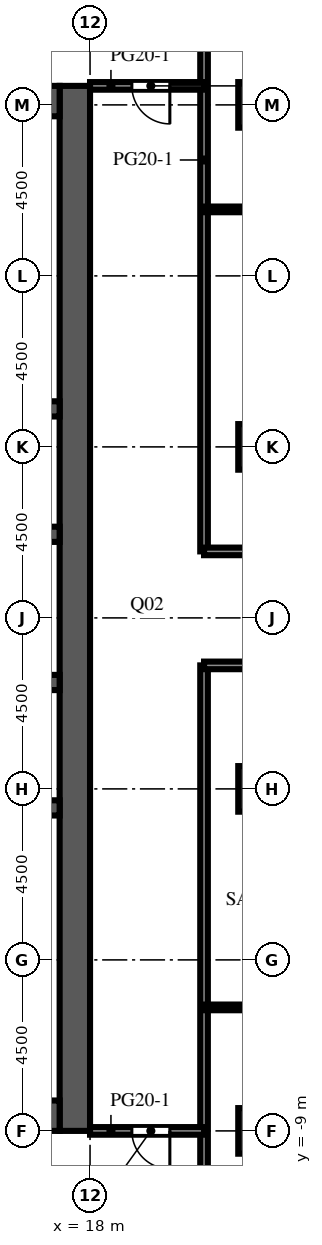
"""IFC4 building model, lengths in metres.
Left out: names, types, materials, properties, quantities, classifications, styles, units other than length and angle.
Written with IfcOpenShell. Run it as: python <this file> out.ifc"""

import sys

from ifc_helpers import new_model, si_unit, direction, frame, frame_2d, origin, origin_2d, place, context, subcontext, project, spatial, rectangle, extrude, element, fill, save


model = new_model("IFC4")
c1 = context("Model", 3, precision=1e-05, world=origin(), true_north=direction((0.0, 1.0)))
c2 = subcontext(c1, "Body", "Model", "MODEL_VIEW")
j1 = project(units=[si_unit("LENGTHUNIT", "METRE"), si_unit("PLANEANGLEUNIT", "RADIAN")], contexts=[c1])
p1 = place(None, origin())
s1 = spatial("IfcSite", under=j1, at=p1, CompositionType="ELEMENT")
p2 = place(p1, origin())
s2 = spatial("IfcBuilding", under=s1, at=p2, CompositionType="ELEMENT")
p3 = place(p2, frame((0.0, 0.0, 195.6)))
s3 = spatial("IfcBuildingStorey", under=s2, at=p3, CompositionType="ELEMENT", Elevation=195.6)
for number, where, z_axis, x_axis in (
    (1, (22.5, -9.0, 0.0), (0.0, 0.0, 1.0), (1.0, 0.0, 0.0)),
    (2, (22.5, 0.0, 0.0), (0.0, 0.0, 1.0), (1.0, 0.0, 0.0)),
    (3, (22.5, 9.0, 0.0), (0.0, 0.0, 1.0), (1.0, 0.0, 0.0)),
    (4, (22.5, 18.0, 0.0), (0.0, 0.0, 1.0), (1.0, 0.0, 0.0)),
):
    element("IfcColumn", number, at=place(p3, frame(where, z_axis=z_axis, x_axis=x_axis)), inside=s3, PredefinedType="COLUMN", context=c2, shape_type="SweptSolid", body=[
        extrude(rectangle(XDim=1.2, YDim=1.2, at=origin_2d()), origin(), (0.0, 0.0, 1.0), 4.1),
    ])
p4 = place(p3, frame((17.6, -9.0, 0.0), z_axis=(0.0, 0.0, 1.0), x_axis=(0.0, 1.0, 0.0)))
e5 = element("IfcWall", 5, at=p4, inside=s3, PredefinedType="SHEAR", context=c2, shape_type="SweptSolid", body=[
    extrude(rectangle(XDim=27.5, YDim=0.8, at=frame_2d((13.75, 0.0))), origin(), (0.0, 0.0, 1.0), 4.1),
])
p5 = place(p4, frame((12.55, 0.0, 0.0)))
e6 = element("IfcOpeningElement", 6, at=p5, cuts=e5, PredefinedType="OPENING", context=c2, shape_type="SweptSolid", body=[
    extrude(rectangle(XDim=2.4, YDim=2.4, at=frame_2d((1.2, 1.2))), frame((0.0, 0.41, 0.0), z_axis=(0.0, -1.0, 0.0), x_axis=(1.0, 0.0, 0.0)), (0.0, 0.0, 1.0), 0.82),
])
p6 = place(p4, frame((6.825, 0.0, 0.0)))
e7 = element("IfcOpeningElement", 7, at=p6, cuts=e5, PredefinedType="OPENING", context=c2, shape_type="SweptSolid", body=[
    extrude(rectangle(XDim=1.2, YDim=2.1, at=frame_2d((0.6, 1.05))), frame((0.0, 0.41, 0.0), z_axis=(0.0, -1.0, 0.0), x_axis=(1.0, 0.0, 0.0)), (0.0, 0.0, 1.0), 0.82),
])
p7 = place(p4, frame((19.475, 0.0, 0.0)))
e8 = element("IfcOpeningElement", 8, at=p7, cuts=e5, PredefinedType="OPENING", context=c2, shape_type="SweptSolid", body=[
    extrude(rectangle(XDim=1.2, YDim=2.1, at=frame_2d((0.6, 1.05))), frame((0.0, 0.41, 0.0), z_axis=(0.0, -1.0, 0.0), x_axis=(1.0, 0.0, 0.0)), (0.0, 0.0, 1.0), 0.82),
])
for number, where, z_axis, x_axis in (
    (9, (6.8, -8.6, 0.0), (0.0, 0.0, 1.0), (1.0, 0.0, 0.0)),
    (10, (6.8, 18.1, 0.0), (0.0, 0.0, 1.0), (1.0, 0.0, 0.0)),
):
    element("IfcWall", number, at=place(p3, frame(where, z_axis=z_axis, x_axis=x_axis)), inside=s3, PredefinedType="SHEAR", context=c2, shape_type="SweptSolid", body=[
        extrude(rectangle(XDim=10.4, YDim=0.8, at=frame_2d((5.2, 0.0))), origin(), (0.0, 0.0, 1.0), 4.1),
    ])
p8 = place(p3, frame((6.8, -0.5, 0.0), z_axis=(0.0, 0.0, 1.0), x_axis=(1.0, 0.0, 0.0)))
e11 = element("IfcWall", 11, at=p8, inside=s3, PredefinedType="SHEAR", context=c2, shape_type="SweptSolid", body=[
    extrude(rectangle(XDim=10.4, YDim=0.4, at=frame_2d((5.2, 0.0))), origin(), (0.0, 0.0, 1.0), 4.1),
])
p9 = place(p3, frame((6.8, 2.8, 0.0), z_axis=(0.0, 0.0, 1.0), x_axis=(1.0, 0.0, 0.0)))
e12 = element("IfcWall", 12, at=p9, inside=s3, PredefinedType="SHEAR", context=c2, shape_type="SweptSolid", body=[
    extrude(rectangle(XDim=10.4, YDim=0.4, at=frame_2d((5.2, 0.0))), origin(), (0.0, 0.0, 1.0), 4.1),
])
p10 = place(p9, frame((0.738, 0.0, 0.0)))
e13 = element("IfcOpeningElement", 13, at=p10, cuts=e12, PredefinedType="OPENING", context=c2, shape_type="SweptSolid", body=[
    extrude(rectangle(XDim=1.1, YDim=2.1, at=frame_2d((0.55, 1.05))), frame((0.0, 0.21, 0.0), z_axis=(0.0, -1.0, 0.0), x_axis=(1.0, 0.0, 0.0)), (0.0, 0.0, 1.0), 0.42),
])
p11 = place(p9, frame((3.337, 0.0, 0.0)))
e14 = element("IfcOpeningElement", 14, at=p11, cuts=e12, PredefinedType="OPENING", context=c2, shape_type="SweptSolid", body=[
    extrude(rectangle(XDim=1.1, YDim=2.1, at=frame_2d((0.55, 1.05))), frame((0.0, 0.21, 0.0), z_axis=(0.0, -1.0, 0.0), x_axis=(1.0, 0.0, 0.0)), (0.0, 0.0, 1.0), 0.42),
])
p12 = place(p9, frame((6.012, 0.0, 0.0)))
e15 = element("IfcOpeningElement", 15, at=p12, cuts=e12, PredefinedType="OPENING", context=c2, shape_type="SweptSolid", body=[
    extrude(rectangle(XDim=1.0, YDim=2.1, at=frame_2d((0.5, 1.05))), frame((0.0, 0.21, 0.0), z_axis=(0.0, -1.0, 0.0), x_axis=(1.0, 0.0, 0.0)), (0.0, 0.0, 1.0), 0.42),
])
p13 = place(p9, frame((8.613, 0.0, 0.0)))
e16 = element("IfcOpeningElement", 16, at=p13, cuts=e12, PredefinedType="OPENING", context=c2, shape_type="SweptSolid", body=[
    extrude(rectangle(XDim=1.0, YDim=2.1, at=frame_2d((0.5, 1.05))), frame((0.0, 0.21, 0.0), z_axis=(0.0, -1.0, 0.0), x_axis=(1.0, 0.0, 0.0)), (0.0, 0.0, 1.0), 0.42),
])
p14 = place(p3, frame((6.8, 6.7, 0.0), z_axis=(0.0, 0.0, 1.0), x_axis=(1.0, 0.0, 0.0)))
e17 = element("IfcWall", 17, at=p14, inside=s3, PredefinedType="SHEAR", context=c2, shape_type="SweptSolid", body=[
    extrude(rectangle(XDim=10.4, YDim=0.4, at=frame_2d((5.2, 0.0))), origin(), (0.0, 0.0, 1.0), 4.1),
])
p15 = place(p14, frame((3.337, 0.0, 0.0)))
e18 = element("IfcOpeningElement", 18, at=p15, cuts=e17, PredefinedType="OPENING", context=c2, shape_type="SweptSolid", body=[
    extrude(rectangle(XDim=1.1, YDim=2.1, at=frame_2d((0.55, 1.05))), frame((0.0, 0.21, 0.0), z_axis=(0.0, -1.0, 0.0), x_axis=(1.0, 0.0, 0.0)), (0.0, 0.0, 1.0), 0.42),
])
p16 = place(p14, frame((5.962, 0.0, 0.0)))
e19 = element("IfcOpeningElement", 19, at=p16, cuts=e17, PredefinedType="OPENING", context=c2, shape_type="SweptSolid", body=[
    extrude(rectangle(XDim=1.1, YDim=2.1, at=frame_2d((0.55, 1.05))), frame((0.0, 0.21, 0.0), z_axis=(0.0, -1.0, 0.0), x_axis=(1.0, 0.0, 0.0)), (0.0, 0.0, 1.0), 0.42),
])
p17 = place(p14, frame((8.663, 0.0, 0.0)))
e20 = element("IfcOpeningElement", 20, at=p17, cuts=e17, PredefinedType="OPENING", context=c2, shape_type="SweptSolid", body=[
    extrude(rectangle(XDim=1.1, YDim=2.1, at=frame_2d((0.55, 1.05))), frame((0.0, 0.21, 0.0), z_axis=(0.0, -1.0, 0.0), x_axis=(1.0, 0.0, 0.0)), (0.0, 0.0, 1.0), 0.42),
])
p18 = place(p14, frame((0.688, 0.0, 0.0)))
e21 = element("IfcOpeningElement", 21, at=p18, cuts=e17, PredefinedType="OPENING", context=c2, shape_type="SweptSolid", body=[
    extrude(rectangle(XDim=1.0, YDim=2.1, at=frame_2d((0.5, 1.05))), frame((0.0, 0.21, 0.0), z_axis=(0.0, -1.0, 0.0), x_axis=(1.0, 0.0, 0.0)), (0.0, 0.0, 1.0), 0.42),
])
p19 = place(p3, frame((6.8, 10.0, 0.0), z_axis=(0.0, 0.0, 1.0), x_axis=(1.0, 0.0, 0.0)))
e22 = element("IfcWall", 22, at=p19, inside=s3, PredefinedType="SHEAR", context=c2, shape_type="SweptSolid", body=[
    extrude(rectangle(XDim=10.4, YDim=0.4, at=frame_2d((5.2, 0.0))), origin(), (0.0, 0.0, 1.0), 4.1),
])
p20 = place(p3, frame((21.0, -26.85, 0.0), z_axis=(0.0, 0.0, 1.0), x_axis=(0.0, 1.0, 0.0)))
e23 = element("IfcWall", 23, at=p20, inside=s3, PredefinedType="PARTITIONING", context=c2, shape_type="SweptSolid", body=[
    extrude(rectangle(XDim=30.1, YDim=0.2, at=frame_2d((15.05, 0.0))), origin(), (0.0, 0.0, 1.0), 3.65),
])
p21 = place(p3, frame((21.0, 6.25, 0.0), z_axis=(0.0, 0.0, 1.0), x_axis=(0.0, 1.0, 0.0)))
e24 = element("IfcWall", 24, at=p21, inside=s3, PredefinedType="PARTITIONING", context=c2, shape_type="SweptSolid", body=[
    extrude(rectangle(XDim=20.6, YDim=0.2, at=frame_2d((10.3, 0.0))), origin(), (0.0, 0.0, 1.0), 3.65),
])
p22 = place(p3, frame((21.0, -9.0, 0.0), z_axis=(0.0, 0.0, 1.0), x_axis=(-1.0, 0.0, 0.0)))
e25 = element("IfcWall", 25, at=p22, inside=s3, PredefinedType="PARTITIONING", context=c2, shape_type="SweptSolid", body=[
    extrude(rectangle(XDim=3.0, YDim=0.2, at=frame_2d((1.5, 0.0))), origin(), (0.0, 0.0, 1.0), 3.65),
])
p23 = place(p22, frame((0.9, 0.0, 0.0)))
e26 = element("IfcOpeningElement", 26, at=p23, cuts=e25, PredefinedType="OPENING", context=c2, shape_type="SweptSolid", body=[
    extrude(rectangle(XDim=1.0, YDim=2.1, at=frame_2d((0.5, 1.05))), frame((0.0, 0.11, 0.0), z_axis=(0.0, -1.0, 0.0), x_axis=(1.0, 0.0, 0.0)), (0.0, 0.0, 1.0), 0.22),
])
p24 = place(p3, frame((31.35, -5.75, 0.0), z_axis=(0.0, 0.0, 1.0), x_axis=(-1.0, 0.0, 0.0)))
e27 = element("IfcWall", 27, at=p24, inside=s3, PredefinedType="PARTITIONING", context=c2, shape_type="SweptSolid", body=[
    extrude(rectangle(XDim=10.35, YDim=0.15, at=frame_2d((5.175, 0.0))), origin(), (0.0, 0.0, 1.0), 3.65),
])
p25 = place(p24, frame((4.75, 0.0, 0.0)))
e28 = element("IfcOpeningElement", 28, at=p25, cuts=e27, PredefinedType="OPENING", context=c2, shape_type="SweptSolid", body=[
    extrude(rectangle(XDim=1.0, YDim=2.1, at=frame_2d((0.5, 1.05))), frame((0.0, 0.085, 0.0), z_axis=(0.0, -1.0, 0.0), x_axis=(1.0, 0.0, 0.0)), (0.0, 0.0, 1.0), 0.17),
])
p26 = place(p3, frame((31.35, 3.25, 0.0), z_axis=(0.0, 0.0, 1.0), x_axis=(-1.0, 0.0, 0.0)))
e29 = element("IfcWall", 29, at=p26, inside=s3, PredefinedType="PARTITIONING", context=c2, shape_type="SweptSolid", body=[
    extrude(rectangle(XDim=10.35, YDim=0.2, at=frame_2d((5.175, 0.0))), origin(), (0.0, 0.0, 1.0), 3.65),
])
p27 = place(p26, frame((4.25, 0.0, 0.0)))
e30 = element("IfcOpeningElement", 30, at=p27, cuts=e29, PredefinedType="OPENING", context=c2, shape_type="SweptSolid", body=[
    extrude(rectangle(XDim=1.0, YDim=2.1, at=frame_2d((0.5, 1.05))), frame((0.0, 0.11, 0.0), z_axis=(0.0, -1.0, 0.0), x_axis=(1.0, 0.0, 0.0)), (0.0, 0.0, 1.0), 0.22),
])
p28 = place(p3, frame((21.0, 6.25, 0.0), z_axis=(0.0, 0.0, 1.0), x_axis=(1.0, 0.0, 0.0)))
e31 = element("IfcWall", 31, at=p28, inside=s3, PredefinedType="PARTITIONING", context=c2, shape_type="SweptSolid", body=[
    extrude(rectangle(XDim=10.35, YDim=0.2, at=frame_2d((5.175, 0.0))), origin(), (0.0, 0.0, 1.0), 3.65),
])
p29 = place(p28, frame((4.85, 0.0, 0.0)))
e32 = element("IfcOpeningElement", 32, at=p29, cuts=e31, PredefinedType="OPENING", context=c2, shape_type="SweptSolid", body=[
    extrude(rectangle(XDim=1.0, YDim=2.1, at=frame_2d((0.5, 1.05))), frame((0.0, 0.11, 0.0), z_axis=(0.0, -1.0, 0.0), x_axis=(1.0, 0.0, 0.0)), (0.0, 0.0, 1.0), 0.22),
])
p30 = place(p3, frame((21.0, 15.25, 0.0), z_axis=(0.0, 0.0, 1.0), x_axis=(1.0, 0.0, 0.0)))
e33 = element("IfcWall", 33, at=p30, inside=s3, PredefinedType="PARTITIONING", context=c2, shape_type="SweptSolid", body=[
    extrude(rectangle(XDim=10.35, YDim=0.15, at=frame_2d((5.175, 0.0))), origin(), (0.0, 0.0, 1.0), 3.65),
])
p31 = place(p30, frame((3.85, 0.0, 0.0)))
e34 = element("IfcOpeningElement", 34, at=p31, cuts=e33, PredefinedType="OPENING", context=c2, shape_type="SweptSolid", body=[
    extrude(rectangle(XDim=1.0, YDim=2.1, at=frame_2d((0.5, 1.05))), frame((0.0, 0.085, 0.0), z_axis=(0.0, -1.0, 0.0), x_axis=(1.0, 0.0, 0.0)), (0.0, 0.0, 1.0), 0.17),
])
p32 = place(p3, frame((18.0, 18.5, 0.0), z_axis=(0.0, 0.0, 1.0), x_axis=(1.0, 0.0, 0.0)))
e35 = element("IfcWall", 35, at=p32, inside=s3, PredefinedType="PARTITIONING", context=c2, shape_type="SweptSolid", body=[
    extrude(rectangle(XDim=3.0, YDim=0.2, at=frame_2d((1.5, 0.0))), origin(), (0.0, 0.0, 1.0), 3.65),
])
p33 = place(p32, frame((1.1, 0.0, 0.0)))
e36 = element("IfcOpeningElement", 36, at=p33, cuts=e35, PredefinedType="OPENING", context=c2, shape_type="SweptSolid", body=[
    extrude(rectangle(XDim=1.0, YDim=2.1, at=frame_2d((0.5, 1.05))), frame((0.0, 0.11, 0.0), z_axis=(0.0, -1.0, 0.0), x_axis=(1.0, 0.0, 0.0)), (0.0, 0.0, 1.0), 0.22),
])
p34 = place(p5, origin())
e37 = element("IfcDoor", 37, at=p34, inside=s3, OperationType="DOUBLE_DOOR_DOUBLE_SWING", PredefinedType="DOOR", context=c2, shape_type="SweptSolid", body=[
    extrude(rectangle(XDim=2.4, YDim=2.4, at=frame_2d((1.2, 1.2))), frame((0.0, 0.025, 0.0), z_axis=(0.0, -1.0, 0.0), x_axis=(1.0, 0.0, 0.0)), (0.0, 0.0, 1.0), 0.05),
])
fill(e6, e37)
p35 = place(p6, frame((1.2, 0.0, 0.0), z_axis=(0.0, 0.0, 1.0), x_axis=(-1.0, 0.0, 0.0)))
e38 = element("IfcDoor", 38, at=p35, inside=s3, OperationType="SINGLE_SWING_LEFT", PredefinedType="DOOR", context=c2, shape_type="SweptSolid", body=[
    extrude(rectangle(XDim=1.2, YDim=2.1, at=frame_2d((0.6, 1.05))), frame((0.0, 0.025, 0.0), z_axis=(0.0, -1.0, 0.0), x_axis=(1.0, 0.0, 0.0)), (0.0, 0.0, 1.0), 0.05),
])
fill(e7, e38)
p36 = place(p7, frame((1.2, 0.0, 0.0), z_axis=(0.0, 0.0, 1.0), x_axis=(-1.0, 0.0, 0.0)))
e39 = element("IfcDoor", 39, at=p36, inside=s3, OperationType="SINGLE_SWING_LEFT", PredefinedType="DOOR", context=c2, shape_type="SweptSolid", body=[
    extrude(rectangle(XDim=1.2, YDim=2.1, at=frame_2d((0.6, 1.05))), frame((0.0, 0.025, 0.0), z_axis=(0.0, -1.0, 0.0), x_axis=(1.0, 0.0, 0.0)), (0.0, 0.0, 1.0), 0.05),
])
fill(e8, e39)
p37 = place(p23, origin())
e40 = element("IfcDoor", 40, at=p37, inside=s3, OperationType="SINGLE_SWING_LEFT", PredefinedType="DOOR", context=c2, shape_type="SweptSolid", body=[
    extrude(rectangle(XDim=1.0, YDim=2.1, at=frame_2d((0.5, 1.05))), frame((0.0, 0.025, 0.0), z_axis=(0.0, -1.0, 0.0), x_axis=(1.0, 0.0, 0.0)), (0.0, 0.0, 1.0), 0.05),
])
fill(e26, e40)
p38 = place(p33, origin())
e41 = element("IfcDoor", 41, at=p38, inside=s3, OperationType="SINGLE_SWING_RIGHT", PredefinedType="DOOR", context=c2, shape_type="SweptSolid", body=[
    extrude(rectangle(XDim=1.0, YDim=2.1, at=frame_2d((0.5, 1.05))), frame((0.0, 0.025, 0.0), z_axis=(0.0, -1.0, 0.0), x_axis=(1.0, 0.0, 0.0)), (0.0, 0.0, 1.0), 0.05),
])
fill(e36, e41)
save(model, sys.argv[1])
